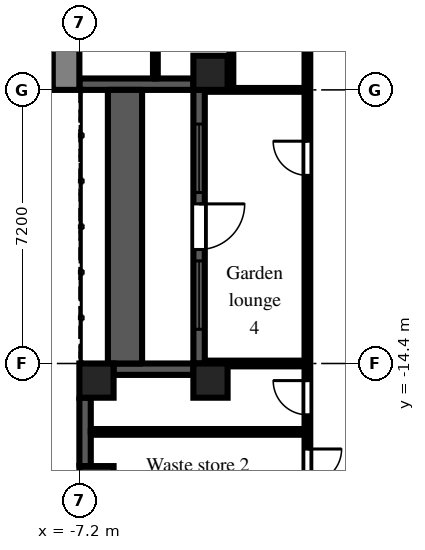
"""IFC4 building model, lengths in metres.
Left out: names, types, materials, properties, quantities, classifications, styles, units other than length and angle.
Written with IfcOpenShell. Run it as: python <this file> out.ifc"""

import sys

from ifc_helpers import new_model, si_unit, direction, frame, frame_2d, origin, origin_2d, place, context, subcontext, project, spatial, rectangle, extrude, element, fill, save


model = new_model("IFC4")
c1 = context("Model", 3, precision=1e-05, world=origin(), true_north=direction((0.0, 1.0)))
c2 = subcontext(c1, "Body", "Model", "MODEL_VIEW")
j1 = project(units=[si_unit("LENGTHUNIT", "METRE"), si_unit("PLANEANGLEUNIT", "RADIAN")], contexts=[c1])
p1 = place(None, origin())
s1 = spatial("IfcSite", under=j1, at=p1, CompositionType="ELEMENT")
p2 = place(p1, origin())
s2 = spatial("IfcBuilding", under=s1, at=p2, CompositionType="ELEMENT")
p3 = place(p2, frame((0.0, 0.0, 102.9)))
s3 = spatial("IfcBuildingStorey", under=s2, at=p3, CompositionType="ELEMENT", Elevation=102.9)
for number, where, z_axis, x_axis in (
    (1, (-6.75, -17.55, 0.0), (0.0, 0.0, 1.0), (1.0, 0.0, 0.0)),
    (2, (-6.75, -14.85, 0.0), (0.0, 0.0, 1.0), (1.0, 0.0, 0.0)),
    (3, (-3.75, -14.85, 0.0), (0.0, 0.0, 1.0), (1.0, 0.0, 0.0)),
    (4, (-3.75, -6.75, 0.0), (0.0, 0.0, 1.0), (1.0, 0.0, 0.0)),
):
    element("IfcColumn", number, at=place(p3, frame(where, z_axis=z_axis, x_axis=x_axis)), inside=s3, PredefinedType="COLUMN", context=c2, shape_type="SweptSolid", body=[
        extrude(rectangle(XDim=0.9, YDim=0.9, at=origin_2d()), origin(), (0.0, 0.0, 1.0), 3.0),
    ])
p4 = place(p3, frame((-7.2, -7.05, 0.0), z_axis=(0.0, 0.0, 1.0), x_axis=(1.0, 0.0, 0.0)))
e5 = element("IfcWall", 5, at=p4, inside=s3, PredefinedType="SOLIDWALL", context=c2, shape_type="SweptSolid", body=[
    extrude(rectangle(XDim=3.0, YDim=0.3, at=frame_2d((1.5, 0.0))), origin(), (0.0, 0.0, 1.0), 2.1),
])
p5 = place(p3, frame((-4.05, -7.2, 0.0), z_axis=(0.0, 0.0, 1.0), x_axis=(0.0, -1.0, 0.0)))
e6 = element("IfcWall", 6, at=p5, inside=s3, PredefinedType="SOLIDWALL", context=c2, shape_type="SweptSolid", body=[
    extrude(rectangle(XDim=7.2, YDim=0.3, at=frame_2d((3.6, 0.0))), origin(), (0.0, 0.0, 1.0), 2.1),
])
p6 = place(p5, frame((3.0, 0.0, 0.0)))
e7 = element("IfcOpeningElement", 7, at=p6, cuts=e6, PredefinedType="OPENING", context=c2, shape_type="SweptSolid", body=[
    extrude(rectangle(XDim=1.2, YDim=2.05, at=frame_2d((0.6, 1.025))), frame((0.0, 0.16, 0.0), z_axis=(0.0, -1.0, 0.0), x_axis=(1.0, 0.0, 0.0)), (0.0, 0.0, 1.0), 0.32),
])
p7 = place(p5, frame((0.9, 0.0, 0.2)))
e8 = element("IfcOpeningElement", 8, at=p7, cuts=e6, PredefinedType="OPENING", context=c2, shape_type="SweptSolid", body=[
    extrude(rectangle(XDim=1.8, YDim=1.85, at=frame_2d((0.9, 0.925))), frame((0.0, 0.16, 0.0), z_axis=(0.0, -1.0, 0.0), x_axis=(1.0, 0.0, 0.0)), (0.0, 0.0, 1.0), 0.32),
])
p8 = place(p5, frame((4.5, 0.0, 0.2)))
e9 = element("IfcOpeningElement", 9, at=p8, cuts=e6, PredefinedType="OPENING", context=c2, shape_type="SweptSolid", body=[
    extrude(rectangle(XDim=1.8, YDim=1.85, at=frame_2d((0.9, 0.925))), frame((0.0, 0.16, 0.0), z_axis=(0.0, -1.0, 0.0), x_axis=(1.0, 0.0, 0.0)), (0.0, 0.0, 1.0), 0.32),
])
p9 = place(p3, frame((-4.2, -14.55, 0.0), z_axis=(0.0, 0.0, 1.0), x_axis=(-1.0, 0.0, 0.0)))
e10 = element("IfcWall", 10, at=p9, inside=s3, PredefinedType="SOLIDWALL", context=c2, shape_type="SweptSolid", body=[
    extrude(rectangle(XDim=2.1, YDim=0.3, at=frame_2d((1.05, 0.0))), origin(), (0.0, 0.0, 1.0), 2.1),
])
p10 = place(p3, frame((-7.05, -15.3, 0.0), z_axis=(0.0, 0.0, 1.0), x_axis=(0.0, -1.0, 0.0)))
e11 = element("IfcWall", 11, at=p10, inside=s3, PredefinedType="SOLIDWALL", context=c2, shape_type="SweptSolid", body=[
    extrude(rectangle(XDim=1.8, YDim=0.3, at=frame_2d((0.9, 0.0))), origin(), (0.0, 0.0, 1.0), 2.1),
])
p11 = place(p3, frame((-6.0, -14.4, 0.0), z_axis=(0.0, 0.0, 1.0), x_axis=(0.0, 1.0, 0.0)))
e12 = element("IfcWall", 12, at=p11, inside=s3, PredefinedType="PARAPET", context=c2, shape_type="SweptSolid", body=[
    extrude(rectangle(XDim=7.2, YDim=0.9, at=frame_2d((3.6, 0.0))), origin(), (0.0, 0.0, 1.0), 0.8),
])
p12 = place(p3, frame((-7.55, -7.2, 0.0), z_axis=(0.0, 0.0, 1.0), x_axis=(0.0, 1.0, 0.0)))
e13 = element("IfcWall", 13, at=p12, inside=s3, PredefinedType="SHEAR", context=c2, shape_type="SweptSolid", body=[
    extrude(rectangle(XDim=14.4, YDim=0.7, at=frame_2d((7.2, 0.0))), origin(), (0.0, 0.0, 1.0), 2.575),
])
p13 = place(p12, frame((6.0, 0.0, 0.0)))
e14 = element("IfcOpeningElement", 14, at=p13, cuts=e13, PredefinedType="OPENING", context=c2, shape_type="SweptSolid", body=[
    extrude(rectangle(XDim=2.4, YDim=2.2, at=frame_2d((1.2, 1.1))), frame((0.0, 0.36, 0.0), z_axis=(0.0, -1.0, 0.0), x_axis=(1.0, 0.0, 0.0)), (0.0, 0.0, 1.0), 0.72),
])
p14 = place(p3, frame((-6.9, -16.2, 0.0), z_axis=(0.0, 0.0, 1.0), x_axis=(1.0, 0.0, 0.0)))
e15 = element("IfcWall", 15, at=p14, inside=s3, PredefinedType="PARTITIONING", context=c2, shape_type="SweptSolid", body=[
    extrude(rectangle(XDim=5.625, YDim=0.15, at=frame_2d((2.812, 0.0))), origin(), (0.0, 0.0, 1.0), 2.575),
])
p15 = place(p3, frame((-5.2, -6.9, 0.0), z_axis=(0.0, 0.0, 1.0), x_axis=(0.0, 1.0, 0.0)))
e16 = element("IfcWall", 16, at=p15, inside=s3, PredefinedType="PARTITIONING", context=c2, shape_type="SweptSolid", body=[
    extrude(rectangle(XDim=5.625, YDim=0.125, at=frame_2d((2.812, 0.0))), origin(), (0.0, 0.0, 1.0), 2.575),
])
p16 = place(p3, frame((-3.9, -14.4, 0.0), z_axis=(0.0, 0.0, 1.0), x_axis=(1.0, 0.0, 0.0)))
e17 = element("IfcWall", 17, at=p16, inside=s3, PredefinedType="PARTITIONING", context=c2, shape_type="SweptSolid", body=[
    extrude(rectangle(XDim=2.625, YDim=0.15, at=frame_2d((1.312, 0.0))), origin(), (0.0, 0.0, 1.0), 2.575),
])
p17 = place(p3, frame((-3.9, -7.2, 0.0), z_axis=(0.0, 0.0, 1.0), x_axis=(1.0, 0.0, 0.0)))
e18 = element("IfcWall", 18, at=p17, inside=s3, PredefinedType="PARTITIONING", context=c2, shape_type="SweptSolid", body=[
    extrude(rectangle(XDim=2.625, YDim=0.1, at=frame_2d((1.312, 0.0))), origin(), (0.0, 0.0, 1.0), 2.575),
])
p18 = place(p3, frame((-3.2, -7.15, 0.0), z_axis=(0.0, 0.0, 1.0), x_axis=(0.0, 1.0, 0.0)))
e19 = element("IfcWall", 19, at=p18, inside=s3, PredefinedType="PARTITIONING", context=c2, shape_type="SweptSolid", body=[
    extrude(rectangle(XDim=5.875, YDim=0.1, at=frame_2d((2.938, 0.0))), origin(), (0.0, 0.0, 1.0), 2.575),
])
p19 = place(p3, frame((-1.2, -36.5, 0.0), z_axis=(0.0, 0.0, 1.0), x_axis=(0.0, 1.0, 0.0)))
e20 = element("IfcWall", 20, at=p19, inside=s3, PredefinedType="PARTITIONING", context=c2, shape_type="SweptSolid", body=[
    extrude(rectangle(XDim=35.225, YDim=0.15, at=frame_2d((17.613, 0.0))), origin(), (0.0, 0.0, 1.0), 2.575),
])
p20 = place(p19, frame((31.85, 0.0, 0.0)))
e21 = element("IfcOpeningElement", 21, at=p20, cuts=e20, PredefinedType="OPENING", context=c2, shape_type="SweptSolid", body=[
    extrude(rectangle(XDim=0.9, YDim=2.1, at=frame_2d((0.45, 1.05))), frame((0.0, 0.085, 0.0), z_axis=(0.0, -1.0, 0.0), x_axis=(1.0, 0.0, 0.0)), (0.0, 0.0, 1.0), 0.17),
])
p21 = place(p19, frame((27.05, 0.0, 0.0)))
e22 = element("IfcOpeningElement", 22, at=p21, cuts=e20, PredefinedType="OPENING", context=c2, shape_type="SweptSolid", body=[
    extrude(rectangle(XDim=0.9, YDim=2.1, at=frame_2d((0.45, 1.05))), frame((0.0, 0.085, 0.0), z_axis=(0.0, -1.0, 0.0), x_axis=(1.0, 0.0, 0.0)), (0.0, 0.0, 1.0), 0.17),
])
p22 = place(p19, frame((20.75, 0.0, 0.0)))
e23 = element("IfcOpeningElement", 23, at=p22, cuts=e20, PredefinedType="OPENING", context=c2, shape_type="SweptSolid", body=[
    extrude(rectangle(XDim=0.9, YDim=2.1, at=frame_2d((0.45, 1.05))), frame((0.0, 0.085, 0.0), z_axis=(0.0, -1.0, 0.0), x_axis=(1.0, 0.0, 0.0)), (0.0, 0.0, 1.0), 0.17),
])
p23 = place(p19, frame((18.95, 0.0, 0.0)))
e24 = element("IfcOpeningElement", 24, at=p23, cuts=e20, PredefinedType="OPENING", context=c2, shape_type="SweptSolid", body=[
    extrude(rectangle(XDim=0.9, YDim=2.1, at=frame_2d((0.45, 1.05))), frame((0.0, 0.085, 0.0), z_axis=(0.0, -1.0, 0.0), x_axis=(1.0, 0.0, 0.0)), (0.0, 0.0, 1.0), 0.17),
])
p24 = place(p19, frame((1.55, 0.0, 0.0)))
e25 = element("IfcOpeningElement", 25, at=p24, cuts=e20, PredefinedType="OPENING", context=c2, shape_type="SweptSolid", body=[
    extrude(rectangle(XDim=1.0, YDim=2.1, at=frame_2d((0.5, 1.05))), frame((0.0, 0.085, 0.0), z_axis=(0.0, -1.0, 0.0), x_axis=(1.0, 0.0, 0.0)), (0.0, 0.0, 1.0), 0.17),
])
p25 = place(p6, origin())
e26 = element("IfcDoor", 26, at=p25, inside=s3, OperationType="SINGLE_SWING_LEFT", PredefinedType="DOOR", context=c2, shape_type="SweptSolid", body=[
    extrude(rectangle(XDim=1.2, YDim=2.05, at=frame_2d((0.6, 1.025))), frame((0.0, 0.025, 0.0), z_axis=(0.0, -1.0, 0.0), x_axis=(1.0, 0.0, 0.0)), (0.0, 0.0, 1.0), 0.05),
])
fill(e7, e26)
p26 = place(p7, origin())
e27 = element("IfcWindow", 27, at=p26, inside=s3, PartitioningType="SINGLE_PANEL", PredefinedType="WINDOW", context=c2, shape_type="SweptSolid", body=[
    extrude(rectangle(XDim=1.8, YDim=1.85, at=frame_2d((0.9, 0.925))), frame((0.0, 0.03, 0.0), z_axis=(0.0, -1.0, 0.0), x_axis=(1.0, 0.0, 0.0)), (0.0, 0.0, 1.0), 0.06),
])
fill(e8, e27)
p27 = place(p8, origin())
e28 = element("IfcWindow", 28, at=p27, inside=s3, PartitioningType="SINGLE_PANEL", PredefinedType="WINDOW", context=c2, shape_type="SweptSolid", body=[
    extrude(rectangle(XDim=1.8, YDim=1.85, at=frame_2d((0.9, 0.925))), frame((0.0, 0.03, 0.0), z_axis=(0.0, -1.0, 0.0), x_axis=(1.0, 0.0, 0.0)), (0.0, 0.0, 1.0), 0.06),
])
fill(e9, e28)
p28 = place(p21, origin())
e29 = element("IfcDoor", 29, at=p28, inside=s3, OperationType="SINGLE_SWING_RIGHT", PredefinedType="DOOR", context=c2, shape_type="SweptSolid", body=[
    extrude(rectangle(XDim=0.9, YDim=2.1, at=frame_2d((0.45, 1.05))), frame((0.0, 0.025, 0.0), z_axis=(0.0, -1.0, 0.0), x_axis=(1.0, 0.0, 0.0)), (0.0, 0.0, 1.0), 0.05),
])
fill(e22, e29)
p29 = place(p22, origin())
e30 = element("IfcDoor", 30, at=p29, inside=s3, OperationType="SINGLE_SWING_RIGHT", PredefinedType="DOOR", context=c2, shape_type="SweptSolid", body=[
    extrude(rectangle(XDim=0.9, YDim=2.1, at=frame_2d((0.45, 1.05))), frame((0.0, 0.025, 0.0), z_axis=(0.0, -1.0, 0.0), x_axis=(1.0, 0.0, 0.0)), (0.0, 0.0, 1.0), 0.05),
])
fill(e23, e30)
p30 = place(p23, frame((0.9, 0.0, 0.0), z_axis=(0.0, 0.0, 1.0), x_axis=(-1.0, 0.0, 0.0)))
e31 = element("IfcDoor", 31, at=p30, inside=s3, OperationType="SINGLE_SWING_LEFT", PredefinedType="DOOR", context=c2, shape_type="SweptSolid", body=[
    extrude(rectangle(XDim=0.9, YDim=2.1, at=frame_2d((0.45, 1.05))), frame((0.0, 0.025, 0.0), z_axis=(0.0, -1.0, 0.0), x_axis=(1.0, 0.0, 0.0)), (0.0, 0.0, 1.0), 0.05),
])
fill(e24, e31)
save(model, sys.argv[1])
